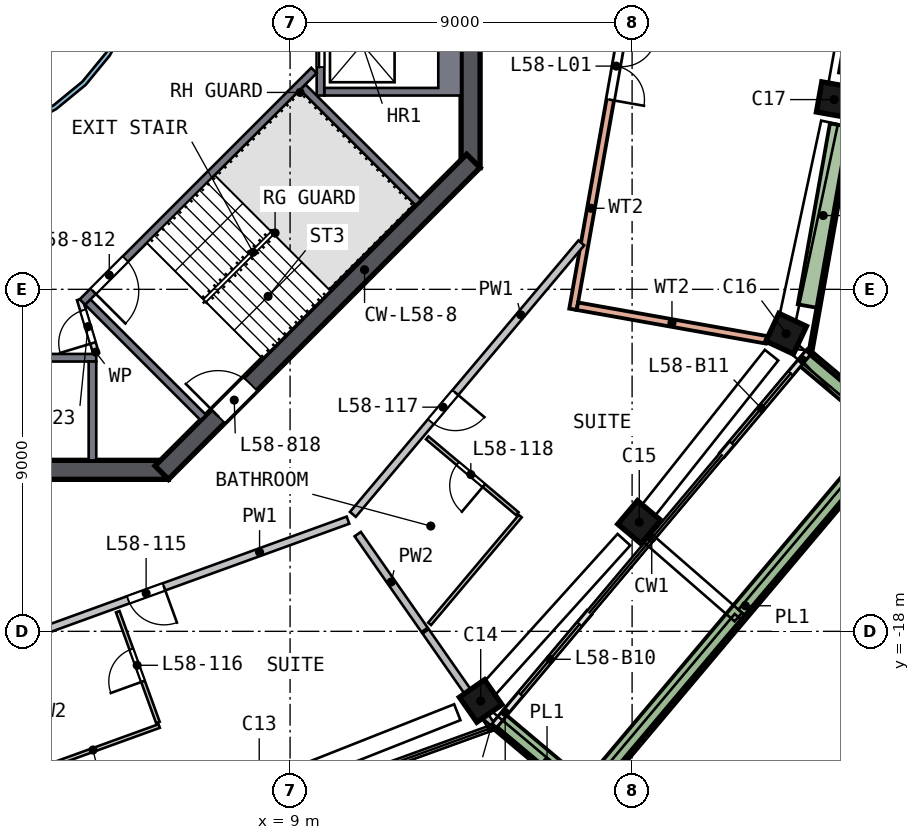
"""IFC4 building model, lengths in metres.
Left out: names, types, materials, properties, quantities, classifications, styles, units other than length and angle.
Written with IfcOpenShell. Run it as: python <this file> out.ifc"""

import sys

from ifc_helpers import new_model, si_unit, direction, frame, frame_2d, origin, origin_2d, place, context, subcontext, project, spatial, polyline, rectangle, outline, extrude, element, fill, save


model = new_model("IFC4")
c1 = context("Model", 3, precision=1e-05, world=origin(), true_north=direction((0.0, 1.0)))
c2 = subcontext(c1, "Body", "Model", "MODEL_VIEW")
j1 = project(units=[si_unit("LENGTHUNIT", "METRE"), si_unit("PLANEANGLEUNIT", "RADIAN")], contexts=[c1])
p1 = place(None, origin())
s1 = spatial("IfcSite", under=j1, at=p1, CompositionType="ELEMENT")
p2 = place(p1, origin())
s2 = spatial("IfcBuilding", under=s1, at=p2, CompositionType="ELEMENT")
p3 = place(p2, frame((0.0, 0.0, 237.5)))
s3 = spatial("IfcBuildingStorey", under=s2, at=p3, CompositionType="ELEMENT", Elevation=237.5)
p4 = place(p3, frame((13.902, -19.913, 0.0), z_axis=(0.094116423, 0.066824181, 0.993315976), x_axis=(-0.814780281, -0.568164298, 0.115422808)))
e1 = element("IfcColumn", 1, at=p4, inside=s3, PredefinedType="COLUMN", context=c2, shape_type="SweptSolid", body=[
    extrude(rectangle(XDim=0.8, YDim=0.8, at=origin_2d()), origin(), (0.0, 0.0, 1.0), 3.211),
])
p5 = place(p3, frame((18.102, -15.233, 0.0), z_axis=(0.071788967, 0.086770351, 0.99363839), x_axis=(0.639875796, 0.760182292, -0.112613711)))
e2 = element("IfcColumn", 2, at=p5, inside=s3, PredefinedType="COLUMN", context=c2, shape_type="SweptSolid", body=[
    extrude(rectangle(XDim=0.8, YDim=0.8, at=origin_2d()), origin(), (0.0, 0.0, 1.0), 3.21),
])
p6 = place(p3, frame((21.996, -10.294, 0.0), z_axis=(0.048046329, 0.104987311, 0.993312244), x_axis=(-0.421003944, -0.899680967, 0.115454914)))
e3 = element("IfcColumn", 3, at=p6, inside=s3, PredefinedType="COLUMN", context=c2, shape_type="SweptSolid", body=[
    extrude(rectangle(XDim=0.8, YDim=0.8, at=origin_2d()), origin(), (0.0, 0.0, 1.0), 3.211),
])
p7 = place(p3, frame((23.293, -4.141, 0.0), z_axis=(0.018783788, 0.111029677, 0.993639562), x_axis=(0.174054393, 0.978276827, -0.112603368)))
e4 = element("IfcColumn", 4, at=p7, inside=s3, PredefinedType="COLUMN", context=c2, shape_type="SweptSolid", body=[
    extrude(rectangle(XDim=0.8, YDim=0.8, at=origin_2d()), origin(), (0.0, 0.0, 1.0), 3.21),
])
p8 = place(p3, frame((13.75, -5.799, 0.0), z_axis=(0.0, 0.0, 1.0), x_axis=(0.0, 1.0, 0.0)))
e5 = element("IfcWall", 5, at=p8, inside=s3, PredefinedType="SHEAR", context=c2, shape_type="SweptSolid", body=[
    extrude(rectangle(XDim=11.598, YDim=0.5, at=frame_2d((5.799, 0.0))), origin(), (0.0, 0.0, 1.0), 3.5),
])
p9 = place(p8, frame((4.899, 0.0, 0.0)))
e6 = element("IfcOpeningElement", 6, at=p9, cuts=e5, PredefinedType="OPENING", context=c2, shape_type="SweptSolid", body=[
    extrude(rectangle(XDim=1.8, YDim=2.1, at=frame_2d((0.9, 1.05))), frame((0.0, 0.26, 0.0), z_axis=(0.0, -1.0, 0.0), x_axis=(1.0, 0.0, 0.0)), (0.0, 0.0, 1.0), 0.52),
])
p10 = place(p3, frame((-5.799, -13.75, 0.0), z_axis=(0.0, 0.0, 1.0), x_axis=(1.0, 0.0, 0.0)))
e7 = element("IfcWall", 7, at=p10, inside=s3, PredefinedType="SHEAR", context=c2, shape_type="SweptSolid", body=[
    extrude(rectangle(XDim=11.598, YDim=0.5, at=frame_2d((5.799, 0.0))), origin(), (0.0, 0.0, 1.0), 3.5),
])
p11 = place(p3, frame((5.622, -13.823, 0.0), z_axis=(0.0, 0.0, 1.0), x_axis=(0.707106781, 0.707106781, 0.0)))
e8 = element("IfcWall", 8, at=p11, inside=s3, PredefinedType="SHEAR", context=c2, shape_type="SweptSolid", body=[
    extrude(rectangle(XDim=11.598, YDim=0.5, at=frame_2d((5.799, 0.0))), origin(), (0.0, 0.0, 1.0), 3.5),
])
p12 = place(p11, frame((2.099, 0.0, 0.0)))
e9 = element("IfcOpeningElement", 9, at=p12, cuts=e8, PredefinedType="OPENING", context=c2, shape_type="SweptSolid", body=[
    extrude(rectangle(XDim=1.2, YDim=2.1, at=frame_2d((0.6, 1.05))), frame((0.0, 0.26, 0.0), z_axis=(0.0, -1.0, 0.0), x_axis=(1.0, 0.0, 0.0)), (0.0, 0.0, 1.0), 0.52),
])
p13 = place(p3, frame((14.383, -20.467, 0.0), z_axis=(0.0, 0.0, 1.0), x_axis=(0.643863246, 0.765140589, 0.0)))
e10 = element("IfcWall", 10, at=p13, inside=s3, PredefinedType="SOLIDWALL", context=c2, shape_type="SweptSolid", body=[
    extrude(rectangle(XDim=3.863, YDim=0.15, at=frame_2d((1.932, 0.0))), origin(), (0.0, 0.0, 1.0), 2.525),
])
p14 = place(p13, frame((1.063, 0.0, 0.0)))
e11 = element("IfcOpeningElement", 11, at=p14, cuts=e10, PredefinedType="OPENING", context=c2, shape_type="SweptSolid", body=[
    extrude(rectangle(XDim=2.4, YDim=2.4, at=frame_2d((1.2, 1.2))), frame((0.0, 0.085, 0.0), z_axis=(0.0, -1.0, 0.0), x_axis=(1.0, 0.0, 0.0)), (0.0, 0.0, 1.0), 0.17),
])
p15 = place(p3, frame((20.368, -13.355, 0.0), z_axis=(0.0, 0.0, 1.0), x_axis=(0.643849339, 0.765152291, 0.0)))
e12 = element("IfcWall", 12, at=p15, inside=s3, PredefinedType="SOLIDWALL", context=c2, shape_type="SweptSolid", body=[
    extrude(rectangle(XDim=3.544, YDim=0.15, at=frame_2d((1.772, 0.0))), origin(), (0.0, 0.0, 1.0), 2.525),
])
p16 = place(p15, frame((0.4, 0.0, 0.0)))
e13 = element("IfcOpeningElement", 13, at=p16, cuts=e12, PredefinedType="OPENING", context=c2, shape_type="SweptSolid", body=[
    extrude(rectangle(XDim=2.4, YDim=2.4, at=frame_2d((1.2, 1.2))), frame((0.0, 0.085, 0.0), z_axis=(0.0, -1.0, 0.0), x_axis=(1.0, 0.0, 0.0)), (0.0, 0.0, 1.0), 0.17),
])
p17 = place(p3, frame((14.538, -20.402, 0.0), z_axis=(0.0, 0.0, 1.0), x_axis=(0.765134779, -0.64387015, 0.0)))
e14 = element("IfcWall", 14, at=p17, inside=s3, PredefinedType="SOLIDWALL", context=c2, shape_type="SweptSolid", body=[
    extrude(rectangle(XDim=3.199, YDim=0.5, at=frame_2d((1.6, 0.0))), origin(), (0.0, 0.0, 1.0), 0.7),
])
p18 = place(p3, frame((16.955, -22.109, 0.0), z_axis=(0.0, 0.0, 1.0), x_axis=(0.643856026, 0.765146665, 0.0)))
e15 = element("IfcWall", 15, at=p18, inside=s3, PredefinedType="SOLIDWALL", context=c2, shape_type="SweptSolid", body=[
    extrude(rectangle(XDim=12.5, YDim=0.5, at=frame_2d((6.25, 0.0))), origin(), (0.0, 0.0, 1.0), 0.7),
])
p19 = place(p3, frame((24.651, -12.575, 0.0), z_axis=(0.0, 0.0, 1.0), x_axis=(-0.765150401, 0.643851585, 0.0)))
e16 = element("IfcWall", 16, at=p19, inside=s3, PredefinedType="SOLIDWALL", context=c2, shape_type="SweptSolid", body=[
    extrude(rectangle(XDim=2.699, YDim=0.5, at=frame_2d((1.35, 0.0))), origin(), (0.0, 0.0, 1.0), 0.7),
])
p20 = place(p3, frame((18.72, 3.274, 0.0), z_axis=(0.0, 0.0, 1.0), x_axis=(-0.175008658, -0.984566895, 0.0)))
e17 = element("IfcWall", 17, at=p20, inside=s3, PredefinedType="SOLIDWALL", context=c2, shape_type="SweptSolid", body=[
    extrude(rectangle(XDim=13.0, YDim=0.2, at=frame_2d((6.5, 0.0))), origin(), (0.0, 0.0, 1.0), 3.19),
])
p21 = place(p20, frame((5.6, 0.0, 0.0)))
e18 = element("IfcOpeningElement", 18, at=p21, cuts=e17, PredefinedType="OPENING", context=c2, shape_type="SweptSolid", body=[
    extrude(rectangle(XDim=1.8, YDim=2.4, at=frame_2d((0.9, 1.2))), frame((0.0, 0.11, 0.0), z_axis=(0.0, -1.0, 0.0), x_axis=(1.0, 0.0, 0.0)), (0.0, 0.0, 1.0), 0.22),
])
p22 = place(p3, frame((21.537, -10.329, 0.0), z_axis=(0.0, 0.0, 1.0), x_axis=(-0.984563433, 0.175028131, 0.0)))
e19 = element("IfcWall", 19, at=p22, inside=s3, PredefinedType="SOLIDWALL", context=c2, shape_type="SweptSolid", body=[
    extrude(rectangle(XDim=5.054, YDim=0.2, at=frame_2d((2.527, 0.0))), origin(), (0.0, 0.0, 1.0), 3.19),
])
p23 = place(p3, frame((22.711, -10.558, 0.0), z_axis=(0.0, 0.0, 1.0), x_axis=(0.175023914, 0.984564183, 0.0)))
e20 = element("IfcWall", 20, at=p23, inside=s3, PredefinedType="SOLIDWALL", context=c2, shape_type="SweptSolid", body=[
    extrude(rectangle(XDim=12.84, YDim=0.1, at=frame_2d((6.42, 0.0))), origin(), (0.0, 0.0, 1.0), 0.7),
])
p24 = place(p3, frame((22.605, -9.439, 0.0), z_axis=(0.0, 0.0, 1.0), x_axis=(0.174997453, 0.984568886, 0.0)))
e21 = element("IfcWall", 21, at=p24, inside=s3, PredefinedType="SOLIDWALL", context=c2, shape_type="SweptSolid", body=[
    extrude(rectangle(XDim=4.837, YDim=0.5, at=frame_2d((2.418, 0.0))), origin(), (0.0, 0.0, 1.0), 0.7),
])
p25 = place(p3, frame((23.69, -3.336, 0.0), z_axis=(0.0, 0.0, 1.0), x_axis=(0.175060918, 0.984557604, 0.0)))
e22 = element("IfcWall", 22, at=p25, inside=s3, PredefinedType="SOLIDWALL", context=c2, shape_type="SweptSolid", body=[
    extrude(rectangle(XDim=5.339, YDim=0.5, at=frame_2d((2.669, 0.0))), origin(), (0.0, 0.0, 1.0), 0.7),
])
p26 = place(p3, origin())
e23 = element("IfcWall", 23, at=p26, inside=s3, PredefinedType="SOLIDWALL", context=c2, shape_type="SweptSolid", body=[
    extrude(outline(polyline([(13.5, -3.9), (9.9, -3.9), (9.9, -3.7), (12.9, -3.7), (12.9, -1.4), (9.9, -1.4), (9.9, -1.2), (13.5, -1.2), (13.5, -3.9)])), origin(), (0.0, 0.0, 1.0), 3.19),
])
p27 = place(p3, frame((9.8, -1.2, 0.0), z_axis=(0.0, 0.0, 1.0), x_axis=(0.0, -1.0, 0.0)))
e24 = element("IfcWall", 24, at=p27, inside=s3, PredefinedType="SOLIDWALL", context=c2, shape_type="SweptSolid", body=[
    extrude(rectangle(XDim=2.7, YDim=0.2, at=frame_2d((1.35, 0.0))), origin(), (0.0, 0.0, 1.0), 3.19),
])
p28 = place(p27, frame((0.75, 0.0, 0.0)))
e25 = element("IfcOpeningElement", 25, at=p28, cuts=e24, PredefinedType="OPENING", context=c2, shape_type="SweptSolid", body=[
    extrude(rectangle(XDim=1.2, YDim=2.1, at=frame_2d((0.6, 1.05))), frame((0.0, 0.11, 0.0), z_axis=(0.0, -1.0, 0.0), x_axis=(1.0, 0.0, 0.0)), (0.0, 0.0, 1.0), 0.22),
])
p29 = place(p3, frame((-3.9, -10.8, 0.0), z_axis=(0.0, 0.0, 1.0), x_axis=(1.0, 0.0, 0.0)))
e26 = element("IfcWall", 26, at=p29, inside=s3, PredefinedType="SOLIDWALL", context=c2, shape_type="SweptSolid", body=[
    extrude(rectangle(XDim=7.8, YDim=0.2, at=frame_2d((3.9, 0.0))), origin(), (0.0, 0.0, 1.0), 3.19),
])
p30 = place(p29, frame((3.45, 0.0, 0.0)))
e27 = element("IfcOpeningElement", 27, at=p30, cuts=e26, PredefinedType="OPENING", context=c2, shape_type="SweptSolid", body=[
    extrude(rectangle(XDim=0.9, YDim=2.1, at=frame_2d((0.45, 1.05))), frame((0.0, 0.11, 0.0), z_axis=(0.0, -1.0, 0.0), x_axis=(1.0, 0.0, 0.0)), (0.0, 0.0, 1.0), 0.22),
])
p31 = place(p3, frame((3.8, -10.9, 0.0), z_axis=(0.0, 0.0, 1.0), x_axis=(0.0, -1.0, 0.0)))
e28 = element("IfcWall", 28, at=p31, inside=s3, PredefinedType="SOLIDWALL", context=c2, shape_type="SweptSolid", body=[
    extrude(rectangle(XDim=2.6, YDim=0.2, at=frame_2d((1.3, 0.0))), origin(), (0.0, 0.0, 1.0), 3.19),
])
p32 = place(p3, frame((9.629, -3.24, 0.0), z_axis=(0.0, 0.0, 1.0), x_axis=(-0.707120946, -0.707092617, 0.0)))
e29 = element("IfcWall", 29, at=p32, inside=s3, PredefinedType="SOLIDWALL", context=c2, shape_type="SweptSolid", body=[
    extrude(rectangle(XDim=8.618, YDim=0.2, at=frame_2d((4.309, 0.0))), origin(), (0.0, 0.0, 1.0), 3.19),
])
p33 = place(p32, frame((7.018, 0.0, 0.0)))
e30 = element("IfcOpeningElement", 30, at=p33, cuts=e29, PredefinedType="OPENING", context=c2, shape_type="SweptSolid", body=[
    extrude(rectangle(XDim=1.2, YDim=2.1, at=frame_2d((0.6, 1.05))), frame((0.0, 0.11, 0.0), z_axis=(0.0, -1.0, 0.0), x_axis=(1.0, 0.0, 0.0)), (0.0, 0.0, 1.0), 0.22),
])
for number, where, z_axis, x_axis in (
    (31, (3.677, -9.334, 0.0), (0.0, 0.0, 1.0), (0.707, -0.707, 0.0)),
    (32, (9.334, -3.677, 0.0), (0.0, 0.0, 1.0), (0.707, -0.707, 0.0)),
):
    element("IfcWall", number, at=place(p3, frame(where, z_axis=z_axis, x_axis=x_axis)), inside=s3, PredefinedType="SOLIDWALL", context=c2, shape_type="SweptSolid", body=[
        extrude(rectangle(XDim=4.3, YDim=0.2, at=frame_2d((2.15, 0.0))), origin(), (0.0, 0.0, 1.0), 3.19),
    ])
p34 = place(p3, frame((3.9, -10.7, 0.0), z_axis=(0.0, 0.0, 1.0), x_axis=(-0.289808785, 0.957084567, 0.0)))
e33 = element("IfcWall", 33, at=p34, inside=s3, PredefinedType="PARTITIONING", context=c2, shape_type="SweptSolid", body=[
    extrude(rectangle(XDim=1.501, YDim=0.15, at=frame_2d((0.75, 0.0))), origin(), (0.0, 0.0, 1.0), 3.19),
])
p35 = place(p34, frame((0.301, 0.0, 0.0)))
e34 = element("IfcOpeningElement", 34, at=p35, cuts=e33, PredefinedType="OPENING", context=c2, shape_type="SweptSolid", body=[
    extrude(rectangle(XDim=0.9, YDim=2.1, at=frame_2d((0.45, 1.05))), frame((0.0, 0.085, 0.0), z_axis=(0.0, -1.0, 0.0), x_axis=(1.0, 0.0, 0.0)), (0.0, 0.0, 1.0), 0.17),
])
p36 = place(p3, origin())
e35 = element("IfcWall", 35, at=p36, inside=s3, PredefinedType="SOLIDWALL", context=c2, shape_type="SweptSolid", body=[
    extrude(outline(polyline([(5.021, -0.999), (4.73, -1.959), (4.257, -2.844), (3.62, -3.62), (2.844, -4.257), (1.959, -4.73), (0.999, -5.021), (0.0, -5.12), (-0.999, -5.021), (-1.959, -4.73), (-2.844, -4.257), (-3.62, -3.62), (-4.257, -2.844), (-4.73, -1.959), (-5.021, -0.999), (-5.12, 0.0), (-5.021, 0.999), (-4.73, 1.959), (-4.257, 2.844), (-3.62, 3.62), (-2.844, 4.257), (-1.959, 4.73), (-0.999, 5.021), (0.0, 5.12), (0.999, 5.021), (1.959, 4.73), (2.844, 4.257), (3.62, 3.62), (4.257, 2.844), (4.73, 1.959), (5.021, 0.999), (5.12, 0.0), (5.021, -0.999)]), holes=[polyline([(4.904, 0.976), (4.619, 1.913), (4.157, 2.778), (3.535, 3.535), (2.778, 4.157), (1.913, 4.619), (0.976, 4.904), (0.0, 5.0), (-0.976, 4.904), (-1.913, 4.619), (-2.778, 4.157), (-3.535, 3.535), (-4.157, 2.778), (-4.619, 1.913), (-4.904, 0.976), (-5.0, 0.0), (-4.904, -0.976), (-4.619, -1.913), (-4.157, -2.778), (-3.535, -3.535), (-2.778, -4.157), (-1.913, -4.619), (-0.976, -4.904), (0.0, -5.0), (0.976, -4.904), (1.913, -4.619), (2.778, -4.157), (3.535, -3.535), (4.157, -2.778), (4.619, -1.913), (4.904, -0.976), (5.0, 0.0), (4.904, 0.976)])]), origin(), (0.0, 0.0, 1.0), 3.19),
])
p37 = place(p3, frame((10.524, -15.075, 0.0), z_axis=(0.0, 0.0, 1.0), x_axis=(-0.940173108, -0.34069712, 0.0)))
e36 = element("IfcWall", 36, at=p37, inside=s3, PredefinedType="SOLIDWALL", context=c2, shape_type="SweptSolid", body=[
    extrude(rectangle(XDim=9.316, YDim=0.2, at=frame_2d((4.658, 0.0))), origin(), (0.0, 0.0, 1.0), 3.19),
])
p38 = place(p37, frame((5.15, 0.0, 0.0)))
e37 = element("IfcOpeningElement", 37, at=p38, cuts=e36, PredefinedType="OPENING", context=c2, shape_type="SweptSolid", body=[
    extrude(rectangle(XDim=1.0, YDim=2.1, at=frame_2d((0.5, 1.05))), frame((0.0, 0.11, 0.0), z_axis=(0.0, -1.0, 0.0), x_axis=(1.0, 0.0, 0.0)), (0.0, 0.0, 1.0), 0.22),
])
p39 = place(p3, frame((16.664, -7.778, 0.0), z_axis=(0.0, 0.0, 1.0), x_axis=(-0.643849849, -0.765151862, 0.0)))
e38 = element("IfcWall", 38, at=p39, inside=s3, PredefinedType="SOLIDWALL", context=c2, shape_type="SweptSolid", body=[
    extrude(rectangle(XDim=9.337, YDim=0.2, at=frame_2d((4.668, 0.0))), origin(), (0.0, 0.0, 1.0), 3.19),
])
p40 = place(p39, frame((5.15, 0.0, 0.0)))
e39 = element("IfcOpeningElement", 39, at=p40, cuts=e38, PredefinedType="OPENING", context=c2, shape_type="SweptSolid", body=[
    extrude(rectangle(XDim=1.0, YDim=2.1, at=frame_2d((0.5, 1.05))), frame((0.0, 0.11, 0.0), z_axis=(0.0, -1.0, 0.0), x_axis=(1.0, 0.0, 0.0)), (0.0, 0.0, 1.0), 0.22),
])
p41 = place(p3, frame((10.78, -15.441, 0.0), z_axis=(0.0, 0.0, 1.0), x_axis=(0.572438677, -0.819947535, 0.0)))
e40 = element("IfcWall", 40, at=p41, inside=s3, PredefinedType="SOLIDWALL", context=c2, shape_type="SweptSolid", body=[
    extrude(rectangle(XDim=3.074, YDim=0.2, at=frame_2d((1.537, 0.0))), origin(), (0.0, 0.0, 1.0), 3.19),
])
p42 = place(p3, frame((12.566, -18.0, 0.0), z_axis=(0.0, 0.0, 1.0), x_axis=(0.572438994, -0.819947314, 0.0)))
e41 = element("IfcWall", 41, at=p42, inside=s3, PredefinedType="SOLIDWALL", context=c2, shape_type="SweptSolid", body=[
    extrude(rectangle(XDim=3.011, YDim=0.2, at=frame_2d((1.506, 0.0))), origin(), (0.0, 0.0, 1.0), 3.19),
])
p43 = place(p3, frame((5.556, -20.491, 0.0), z_axis=(0.0, 0.0, 1.0), x_axis=(-0.940171961, -0.340700285, 0.0)))
e42 = element("IfcWall", 42, at=p43, inside=s3, PredefinedType="PARTITIONING", context=c2, shape_type="SweptSolid", body=[
    extrude(rectangle(XDim=3.704, YDim=0.1, at=frame_2d((1.852, 0.0))), origin(), (0.0, 0.0, 1.0), 3.19),
])
p44 = place(p3, frame((5.521, -20.397, 0.0), z_axis=(0.0, 0.0, 1.0), x_axis=(-0.340693169, 0.940174539, 0.0)))
e43 = element("IfcWall", 43, at=p44, inside=s3, PredefinedType="PARTITIONING", context=c2, shape_type="SweptSolid", body=[
    extrude(rectangle(XDim=3.1, YDim=0.1, at=frame_2d((1.55, 0.0))), origin(), (0.0, 0.0, 1.0), 3.19),
])
p45 = place(p44, frame((1.15, 0.0, 0.0)))
e44 = element("IfcOpeningElement", 44, at=p45, cuts=e43, PredefinedType="OPENING", context=c2, shape_type="SweptSolid", body=[
    extrude(rectangle(XDim=0.9, YDim=2.1, at=frame_2d((0.45, 1.05))), frame((0.0, 0.06, 0.0), z_axis=(0.0, -1.0, 0.0), x_axis=(1.0, 0.0, 0.0)), (0.0, 0.0, 1.0), 0.12),
])
p46 = place(p3, frame((14.981, -14.904, 0.0), z_axis=(0.0, 0.0, 1.0), x_axis=(-0.765178668, 0.643817992, 0.0)))
e45 = element("IfcWall", 45, at=p46, inside=s3, PredefinedType="PARTITIONING", context=c2, shape_type="SweptSolid", body=[
    extrude(rectangle(XDim=3.1, YDim=0.1, at=frame_2d((1.55, 0.0))), origin(), (0.0, 0.0, 1.0), 3.19),
])
p47 = place(p46, frame((1.15, 0.0, 0.0)))
e46 = element("IfcOpeningElement", 46, at=p47, cuts=e45, PredefinedType="OPENING", context=c2, shape_type="SweptSolid", body=[
    extrude(rectangle(XDim=0.9, YDim=2.1, at=frame_2d((0.45, 1.05))), frame((0.0, 0.06, 0.0), z_axis=(0.0, -1.0, 0.0), x_axis=(1.0, 0.0, 0.0)), (0.0, 0.0, 1.0), 0.12),
])
p48 = place(p3, frame((15.057, -14.968, 0.0), z_axis=(0.0, 0.0, 1.0), x_axis=(-0.643827179, -0.765170938, 0.0)))
e47 = element("IfcWall", 47, at=p48, inside=s3, PredefinedType="PARTITIONING", context=c2, shape_type="SweptSolid", body=[
    extrude(rectangle(XDim=3.704, YDim=0.1, at=frame_2d((1.852, 0.0))), origin(), (0.0, 0.0, 1.0), 3.19),
])
p49 = place(p14, origin())
e48 = element("IfcDoor", 48, at=p49, inside=s3, OperationType="SLIDING_TO_LEFT", PredefinedType="DOOR", context=c2, shape_type="SweptSolid", body=[
    extrude(rectangle(XDim=2.4, YDim=2.4, at=frame_2d((1.2, 1.2))), frame((0.0, 0.025, 0.0), z_axis=(0.0, -1.0, 0.0), x_axis=(1.0, 0.0, 0.0)), (0.0, 0.0, 1.0), 0.05),
])
fill(e11, e48)
p50 = place(p16, origin())
e49 = element("IfcDoor", 49, at=p50, inside=s3, OperationType="SLIDING_TO_RIGHT", PredefinedType="DOOR", context=c2, shape_type="SweptSolid", body=[
    extrude(rectangle(XDim=2.4, YDim=2.4, at=frame_2d((1.2, 1.2))), frame((0.0, 0.025, 0.0), z_axis=(0.0, -1.0, 0.0), x_axis=(1.0, 0.0, 0.0)), (0.0, 0.0, 1.0), 0.05),
])
fill(e13, e49)
p51 = place(p21, origin())
e50 = element("IfcDoor", 50, at=p51, inside=s3, OperationType="DOUBLE_DOOR_SINGLE_SWING", PredefinedType="DOOR", context=c2, shape_type="SweptSolid", body=[
    extrude(rectangle(XDim=1.8, YDim=2.4, at=frame_2d((0.9, 1.2))), frame((0.0, 0.025, 0.0), z_axis=(0.0, -1.0, 0.0), x_axis=(1.0, 0.0, 0.0)), (0.0, 0.0, 1.0), 0.05),
])
fill(e18, e50)
p52 = place(p28, origin())
e51 = element("IfcDoor", 51, at=p52, inside=s3, OperationType="DOUBLE_DOOR_SLIDING", PredefinedType="DOOR", context=c2, shape_type="SweptSolid", body=[
    extrude(rectangle(XDim=1.2, YDim=2.1, at=frame_2d((0.6, 1.05))), frame((0.0, 0.025, 0.0), z_axis=(0.0, -1.0, 0.0), x_axis=(1.0, 0.0, 0.0)), (0.0, 0.0, 1.0), 0.05),
])
fill(e25, e51)
p53 = place(p33, origin())
e52 = element("IfcDoor", 52, at=p53, inside=s3, OperationType="SINGLE_SWING_RIGHT", PredefinedType="DOOR", context=c2, shape_type="SweptSolid", body=[
    extrude(rectangle(XDim=1.2, YDim=2.1, at=frame_2d((0.6, 1.05))), frame((0.0, 0.025, 0.0), z_axis=(0.0, -1.0, 0.0), x_axis=(1.0, 0.0, 0.0)), (0.0, 0.0, 1.0), 0.05),
])
fill(e30, e52)
p54 = place(p12, origin())
e53 = element("IfcDoor", 53, at=p54, inside=s3, OperationType="SINGLE_SWING_LEFT", PredefinedType="DOOR", context=c2, shape_type="SweptSolid", body=[
    extrude(rectangle(XDim=1.2, YDim=2.1, at=frame_2d((0.6, 1.05))), frame((0.0, 0.025, 0.0), z_axis=(0.0, -1.0, 0.0), x_axis=(1.0, 0.0, 0.0)), (0.0, 0.0, 1.0), 0.05),
])
fill(e9, e53)
p55 = place(p35, origin())
e54 = element("IfcDoor", 54, at=p55, inside=s3, OperationType="SINGLE_SWING_LEFT", PredefinedType="DOOR", context=c2, shape_type="SweptSolid", body=[
    extrude(rectangle(XDim=0.9, YDim=2.1, at=frame_2d((0.45, 1.05))), frame((0.0, 0.025, 0.0), z_axis=(0.0, -1.0, 0.0), x_axis=(1.0, 0.0, 0.0)), (0.0, 0.0, 1.0), 0.05),
])
fill(e34, e54)
p56 = place(p38, origin())
e55 = element("IfcDoor", 55, at=p56, inside=s3, OperationType="SINGLE_SWING_LEFT", PredefinedType="DOOR", context=c2, shape_type="SweptSolid", body=[
    extrude(rectangle(XDim=1.0, YDim=2.1, at=frame_2d((0.5, 1.05))), frame((0.0, 0.025, 0.0), z_axis=(0.0, -1.0, 0.0), x_axis=(1.0, 0.0, 0.0)), (0.0, 0.0, 1.0), 0.05),
])
fill(e37, e55)
p57 = place(p45, origin())
e56 = element("IfcDoor", 56, at=p57, inside=s3, OperationType="SINGLE_SWING_LEFT", PredefinedType="DOOR", context=c2, shape_type="SweptSolid", body=[
    extrude(rectangle(XDim=0.9, YDim=2.1, at=frame_2d((0.45, 1.05))), frame((0.0, 0.025, 0.0), z_axis=(0.0, -1.0, 0.0), x_axis=(1.0, 0.0, 0.0)), (0.0, 0.0, 1.0), 0.05),
])
fill(e44, e56)
p58 = place(p40, origin())
e57 = element("IfcDoor", 57, at=p58, inside=s3, OperationType="SINGLE_SWING_LEFT", PredefinedType="DOOR", context=c2, shape_type="SweptSolid", body=[
    extrude(rectangle(XDim=1.0, YDim=2.1, at=frame_2d((0.5, 1.05))), frame((0.0, 0.025, 0.0), z_axis=(0.0, -1.0, 0.0), x_axis=(1.0, 0.0, 0.0)), (0.0, 0.0, 1.0), 0.05),
])
fill(e39, e57)
p59 = place(p47, origin())
e58 = element("IfcDoor", 58, at=p59, inside=s3, OperationType="SINGLE_SWING_LEFT", PredefinedType="DOOR", context=c2, shape_type="SweptSolid", body=[
    extrude(rectangle(XDim=0.9, YDim=2.1, at=frame_2d((0.45, 1.05))), frame((0.0, 0.025, 0.0), z_axis=(0.0, -1.0, 0.0), x_axis=(1.0, 0.0, 0.0)), (0.0, 0.0, 1.0), 0.05),
])
fill(e46, e58)
save(model, sys.argv[1])
